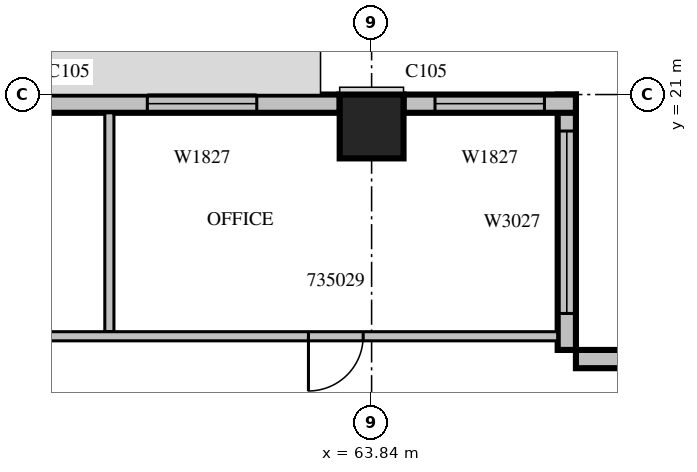
"""IFC4 building model, lengths in metres.
Left out: names, types, materials, properties, quantities, classifications, styles, units other than length and angle.
Written with IfcOpenShell. Run it as: python <this file> out.ifc"""

import sys

from ifc_helpers import new_model, si_unit, direction, frame, frame_2d, origin, origin_2d, place, context, subcontext, project, spatial, rectangle, extrude, source, transform, mapped, element, fill, save


model = new_model("IFC4")
c1 = context("Model", 3, precision=1e-05, world=origin(), true_north=direction((0.0, 1.0)))
c2 = subcontext(c1, "Body", "Model", "MODEL_VIEW")
j1 = project(units=[si_unit("LENGTHUNIT", "METRE"), si_unit("PLANEANGLEUNIT", "RADIAN")], contexts=[c1])
p1 = place(None, origin())
s1 = spatial("IfcSite", under=j1, at=p1, CompositionType="ELEMENT")
p2 = place(p1, origin())
s2 = spatial("IfcBuilding", under=s1, at=p2, CompositionType="ELEMENT")
p3 = place(p2, frame((0.0, 0.0, 158.1)))
s3 = spatial("IfcBuildingStorey", under=s2, at=p3, CompositionType="ELEMENT", Elevation=158.1)
m1 = source(origin(), c2, "Body", "SweptSolid", [
    extrude(rectangle(XDim=1.05, YDim=1.05, at=origin_2d()), origin(), (0.0, 0.0, 1.0), 4.2),
])
p4 = place(p3, frame((63.84, 20.475, 0.0), z_axis=(0.0, 0.0, 1.0), x_axis=(1.0, 0.0, 0.0)))
e1 = element("IfcColumn", 1, at=p4, inside=s3, PredefinedType="COLUMN", context=c2, shape_type="MappedRepresentation", body=[
    mapped(m1, transform((0.0, 0.0, 0.0), scale=1.0)),
])
m2 = source(origin(), c2, "Body", "SweptSolid", [
    extrude(rectangle(XDim=4.2, YDim=0.3, at=frame_2d((2.1, 0.0))), origin(), (0.0, 0.0, 1.0), 3.8),
])
p5 = place(p3, frame((71.4, 16.65, 0.0), z_axis=(0.0, 0.0, 1.0), x_axis=(-1.0, 0.0, 0.0)))
e2 = element("IfcWall", 2, at=p5, inside=s3, PredefinedType="STANDARD", context=c2, shape_type="MappedRepresentation", body=[
    mapped(m2, transform((0.0, 0.0, 0.0), scale=1.0)),
])
m3 = source(origin(), c2, "Body", "SweptSolid", [
    extrude(rectangle(XDim=1.2, YDim=2.7, at=frame_2d((0.6, 1.35))), frame((0.0, 0.16, 0.0), z_axis=(0.0, -1.0, 0.0), x_axis=(1.0, 0.0, 0.0)), (0.0, 0.0, 1.0), 0.32),
])
p6 = place(p5, frame((0.66, 0.0, 0.6)))
e3 = element("IfcOpeningElement", 3, at=p6, cuts=e2, PredefinedType="OPENING", context=c2, shape_type="MappedRepresentation", body=[
    mapped(m3, transform((0.0, 0.0, 0.0), scale=1.0)),
])
p7 = place(p3, frame((67.05, 16.8, 0.0), z_axis=(0.0, 0.0, 1.0), x_axis=(0.0, 1.0, 0.0)))
e4 = element("IfcWall", 4, at=p7, inside=s3, PredefinedType="STANDARD", context=c2, shape_type="MappedRepresentation", body=[
    mapped(m2, transform((0.0, 0.0, 0.0), scale=1.0)),
])
m4 = source(origin(), c2, "Body", "SweptSolid", [
    extrude(rectangle(XDim=3.0, YDim=2.7, at=frame_2d((1.5, 1.35))), frame((0.0, 0.16, 0.0), z_axis=(0.0, -1.0, 0.0), x_axis=(1.0, 0.0, 0.0)), (0.0, 0.0, 1.0), 0.32),
])
p8 = place(p7, frame((0.6, 0.0, 0.6)))
e5 = element("IfcOpeningElement", 5, at=p8, cuts=e4, PredefinedType="OPENING", context=c2, shape_type="MappedRepresentation", body=[
    mapped(m4, transform((0.0, 0.0, 0.0), scale=1.0)),
])
m5 = source(origin(), c2, "Body", "SweptSolid", [
    extrude(rectangle(XDim=2.835, YDim=0.3, at=frame_2d((1.417, 0.0))), origin(), (0.0, 0.0, 1.0), 3.8),
])
p9 = place(p3, frame((67.2, 20.85, 0.0), z_axis=(0.0, 0.0, 1.0), x_axis=(-1.0, 0.0, 0.0)))
e6 = element("IfcWall", 6, at=p9, inside=s3, PredefinedType="STANDARD", context=c2, shape_type="MappedRepresentation", body=[
    mapped(m5, transform((0.0, 0.0, 0.0), scale=1.0)),
])
m6 = source(origin(), c2, "Body", "SweptSolid", [
    extrude(rectangle(XDim=1.8, YDim=2.7, at=frame_2d((0.9, 1.35))), frame((0.0, 0.16, 0.0), z_axis=(0.0, -1.0, 0.0), x_axis=(1.0, 0.0, 0.0)), (0.0, 0.0, 1.0), 0.32),
])
p10 = place(p9, frame((0.517, 0.0, 0.6)))
e7 = element("IfcOpeningElement", 7, at=p10, cuts=e6, PredefinedType="OPENING", context=c2, shape_type="MappedRepresentation", body=[
    mapped(m6, transform((0.0, 0.0, 0.0), scale=1.0)),
])
m7 = source(origin(), c2, "Body", "SweptSolid", [
    extrude(rectangle(XDim=4.83, YDim=0.3, at=frame_2d((2.415, 0.0))), origin(), (0.0, 0.0, 1.0), 3.8),
])
p11 = place(p3, frame((63.315, 20.85, 0.0), z_axis=(0.0, 0.0, 1.0), x_axis=(-1.0, 0.0, 0.0)))
e8 = element("IfcWall", 8, at=p11, inside=s3, PredefinedType="STANDARD", context=c2, shape_type="MappedRepresentation", body=[
    mapped(m7, transform((0.0, 0.0, 0.0), scale=1.0)),
])
p12 = place(p11, frame((1.363, 0.0, 0.6)))
e9 = element("IfcOpeningElement", 9, at=p12, cuts=e8, PredefinedType="OPENING", context=c2, shape_type="MappedRepresentation", body=[
    mapped(m6, transform((0.0, 0.0, 0.0), scale=1.0)),
])
m8 = source(origin(), c2, "Body", "SweptSolid", [
    extrude(rectangle(XDim=3.6, YDim=0.15, at=frame_2d((1.8, 0.0))), origin(), (0.0, 0.0, 1.0), 3.8),
])
p13 = place(p3, frame((59.528, 20.7, 0.0), z_axis=(0.0, 0.0, 1.0), x_axis=(0.0, -1.0, 0.0)))
e10 = element("IfcWall", 10, at=p13, inside=s3, PredefinedType="PARTITIONING", context=c2, shape_type="MappedRepresentation", body=[
    mapped(m8, transform((0.0, 0.0, 0.0), scale=1.0)),
])
m9 = source(origin(), c2, "Body", "SweptSolid", [
    extrude(rectangle(XDim=37.5, YDim=0.15, at=frame_2d((18.75, 0.0))), origin(), (0.0, 0.0, 1.0), 3.8),
])
p14 = place(p3, frame((29.4, 17.025, 0.0), z_axis=(0.0, 0.0, 1.0), x_axis=(1.0, 0.0, 0.0)))
e11 = element("IfcWall", 11, at=p14, inside=s3, PredefinedType="PARTITIONING", context=c2, shape_type="MappedRepresentation", body=[
    mapped(m9, transform((0.0, 0.0, 0.0), scale=1.0)),
])
m10 = source(origin(), c2, "Body", "SweptSolid", [
    extrude(rectangle(XDim=1.0, YDim=2.1, at=frame_2d((0.5, 1.05))), frame((0.0, 0.085, 0.0), z_axis=(0.0, -1.0, 0.0), x_axis=(1.0, 0.0, 0.0)), (0.0, 0.0, 1.0), 0.17),
])
p15 = place(p14, frame((1.357, 0.0, 0.0)))
e12 = element("IfcOpeningElement", 12, at=p15, cuts=e11, PredefinedType="OPENING", context=c2, shape_type="MappedRepresentation", body=[
    mapped(m10, transform((0.0, 0.0, 0.0), scale=1.0)),
])
p16 = place(p14, frame((4.669, 0.0, 0.0)))
e13 = element("IfcOpeningElement", 13, at=p16, cuts=e11, PredefinedType="OPENING", context=c2, shape_type="MappedRepresentation", body=[
    mapped(m10, transform((0.0, 0.0, 0.0), scale=1.0)),
])
p17 = place(p14, frame((7.012, 0.0, 0.0)))
e14 = element("IfcOpeningElement", 14, at=p17, cuts=e11, PredefinedType="OPENING", context=c2, shape_type="MappedRepresentation", body=[
    mapped(m10, transform((0.0, 0.0, 0.0), scale=1.0)),
])
p18 = place(p14, frame((9.274, 0.0, 0.0)))
e15 = element("IfcOpeningElement", 15, at=p18, cuts=e11, PredefinedType="OPENING", context=c2, shape_type="MappedRepresentation", body=[
    mapped(m10, transform((0.0, 0.0, 0.0), scale=1.0)),
])
m11 = source(origin(), c2, "Body", "SweptSolid", [
    extrude(rectangle(XDim=0.9, YDim=2.1, at=frame_2d((0.45, 1.05))), frame((0.0, 0.085, 0.0), z_axis=(0.0, -1.0, 0.0), x_axis=(1.0, 0.0, 0.0)), (0.0, 0.0, 1.0), 0.17),
])
p19 = place(p14, frame((11.424, 0.0, 0.0)))
e16 = element("IfcOpeningElement", 16, at=p19, cuts=e11, PredefinedType="OPENING", context=c2, shape_type="MappedRepresentation", body=[
    mapped(m11, transform((0.0, 0.0, 0.0), scale=1.0)),
])
p20 = place(p14, frame((13.084, 0.0, 0.0)))
e17 = element("IfcOpeningElement", 17, at=p20, cuts=e11, PredefinedType="OPENING", context=c2, shape_type="MappedRepresentation", body=[
    mapped(m11, transform((0.0, 0.0, 0.0), scale=1.0)),
])
p21 = place(p14, frame((15.184, 0.0, 0.0)))
e18 = element("IfcOpeningElement", 18, at=p21, cuts=e11, PredefinedType="OPENING", context=c2, shape_type="MappedRepresentation", body=[
    mapped(m11, transform((0.0, 0.0, 0.0), scale=1.0)),
])
p22 = place(p14, frame((18.228, 0.0, 0.0)))
e19 = element("IfcOpeningElement", 19, at=p22, cuts=e11, PredefinedType="OPENING", context=c2, shape_type="MappedRepresentation", body=[
    mapped(m10, transform((0.0, 0.0, 0.0), scale=1.0)),
])
p23 = place(p14, frame((21.218, 0.0, 0.0)))
e20 = element("IfcOpeningElement", 20, at=p23, cuts=e11, PredefinedType="OPENING", context=c2, shape_type="MappedRepresentation", body=[
    mapped(m11, transform((0.0, 0.0, 0.0), scale=1.0)),
])
p24 = place(p14, frame((25.954, 0.0, 0.0)))
e21 = element("IfcOpeningElement", 21, at=p24, cuts=e11, PredefinedType="OPENING", context=c2, shape_type="MappedRepresentation", body=[
    mapped(m11, transform((0.0, 0.0, 0.0), scale=1.0)),
])
p25 = place(p14, frame((33.401, 0.0, 0.0)))
e22 = element("IfcOpeningElement", 22, at=p25, cuts=e11, PredefinedType="OPENING", context=c2, shape_type="MappedRepresentation", body=[
    mapped(m11, transform((0.0, 0.0, 0.0), scale=1.0)),
])
m12 = source(origin(), c2, "Body", "SweptSolid", [
    extrude(rectangle(XDim=3.0, YDim=2.7, at=frame_2d((1.5, 1.35))), frame((0.0, 0.03, 0.0), z_axis=(0.0, -1.0, 0.0), x_axis=(1.0, 0.0, 0.0)), (0.0, 0.0, 1.0), 0.06),
])
p26 = place(p8, origin())
e23 = element("IfcWindow", 23, at=p26, inside=s3, PartitioningType="SINGLE_PANEL", PredefinedType="WINDOW", context=c2, shape_type="MappedRepresentation", body=[
    mapped(m12, transform((0.0, 0.0, 0.0), scale=1.0)),
])
fill(e5, e23)
m13 = source(origin(), c2, "Body", "SweptSolid", [
    extrude(rectangle(XDim=1.8, YDim=2.7, at=frame_2d((0.9, 1.35))), frame((0.0, 0.03, 0.0), z_axis=(0.0, -1.0, 0.0), x_axis=(1.0, 0.0, 0.0)), (0.0, 0.0, 1.0), 0.06),
])
p27 = place(p12, origin())
e24 = element("IfcWindow", 24, at=p27, inside=s3, PartitioningType="SINGLE_PANEL", PredefinedType="WINDOW", context=c2, shape_type="MappedRepresentation", body=[
    mapped(m13, transform((0.0, 0.0, 0.0), scale=1.0)),
])
fill(e9, e24)
p28 = place(p10, origin())
e25 = element("IfcWindow", 25, at=p28, inside=s3, PartitioningType="SINGLE_PANEL", PredefinedType="WINDOW", context=c2, shape_type="MappedRepresentation", body=[
    mapped(m13, transform((0.0, 0.0, 0.0), scale=1.0)),
])
fill(e7, e25)
m14 = source(origin(), c2, "Body", "SweptSolid", [
    extrude(rectangle(XDim=0.9, YDim=2.1, at=frame_2d((0.45, 1.05))), frame((0.0, 0.025, 0.0), z_axis=(0.0, -1.0, 0.0), x_axis=(1.0, 0.0, 0.0)), (0.0, 0.0, 1.0), 0.05),
])
p29 = place(p25, origin())
e26 = element("IfcDoor", 26, at=p29, inside=s3, OperationType="SINGLE_SWING_RIGHT", PredefinedType="DOOR", context=c2, shape_type="MappedRepresentation", body=[
    mapped(m14, transform((0.0, 0.0, 0.0), scale=1.0)),
])
fill(e22, e26)
save(model, sys.argv[1])
